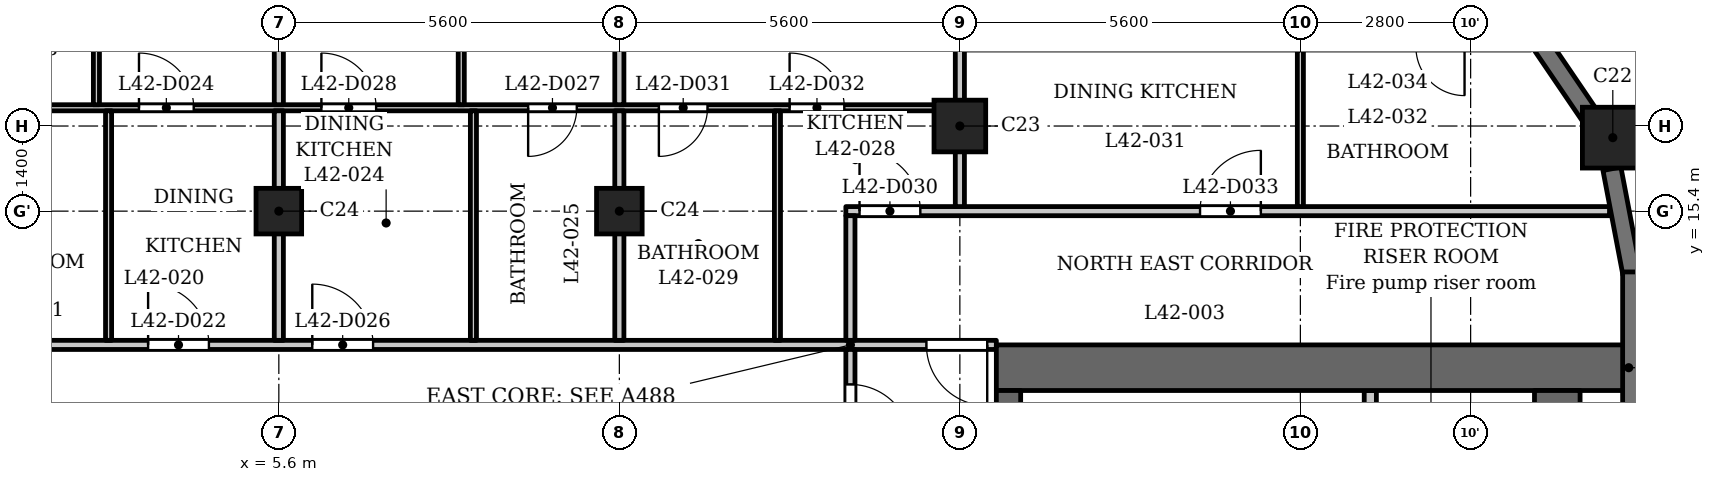
"""IFC4 building model, lengths in metres.
Left out: names, types, materials, properties, quantities, classifications, styles, units other than length and angle.
Written with IfcOpenShell. Run it as: python <this file> out.ifc"""

import sys

from ifc_helpers import new_model, si_unit, direction, frame, frame_2d, origin, origin_2d, place, context, subcontext, project, spatial, rectangle, extrude, element, fill, save


model = new_model("IFC4")
c1 = context("Model", 3, precision=1e-05, world=origin(), true_north=direction((0.0, 1.0)))
c2 = subcontext(c1, "Body", "Model", "MODEL_VIEW")
j1 = project(units=[si_unit("LENGTHUNIT", "METRE"), si_unit("PLANEANGLEUNIT", "RADIAN")], contexts=[c1])
p1 = place(None, origin())
s1 = spatial("IfcSite", under=j1, at=p1, CompositionType="ELEMENT")
p2 = place(p1, origin())
s2 = spatial("IfcBuilding", under=s1, at=p2, CompositionType="ELEMENT")
p3 = place(p2, frame((0.0, 0.0, 164.1)))
s3 = spatial("IfcBuildingStorey", under=s2, at=p3, CompositionType="ELEMENT", Elevation=164.1)
p4 = place(p3, frame((27.538, 16.609, 0.0), z_axis=(0.0, 0.0, 1.0), x_axis=(1.0, 0.0, 0.0)))
e1 = element("IfcColumn", 1, at=p4, inside=s3, PredefinedType="COLUMN", context=c2, shape_type="SweptSolid", body=[
    extrude(rectangle(XDim=1.0, YDim=1.0, at=origin_2d()), origin(), (0.0, 0.0, 1.0), 3.5),
])
p5 = place(p3, frame((16.8, 16.8, 0.0), z_axis=(0.0, 0.0, 1.0), x_axis=(1.0, 0.0, 0.0)))
e2 = element("IfcColumn", 2, at=p5, inside=s3, PredefinedType="COLUMN", context=c2, shape_type="SweptSolid", body=[
    extrude(rectangle(XDim=0.85, YDim=0.85, at=origin_2d()), origin(), (0.0, 0.0, 1.0), 3.5),
])
for number, where, z_axis, x_axis in (
    (3, (5.6, 15.4, 0.0), (0.0, 0.0, 1.0), (1.0, 0.0, 0.0)),
    (4, (11.2, 15.4, 0.0), (0.0, 0.0, 1.0), (1.0, 0.0, 0.0)),
):
    element("IfcColumn", number, at=place(p3, frame(where, z_axis=z_axis, x_axis=x_axis)), inside=s3, PredefinedType="COLUMN", context=c2, shape_type="SweptSolid", body=[
        extrude(rectangle(XDim=0.75, YDim=0.75, at=origin_2d()), origin(), (0.0, 0.0, 1.0), 3.5),
    ])
p6 = place(p3, frame((27.85, 11.7, 0.0), z_axis=(0.0, 0.0, 1.0), x_axis=(0.0, 1.0, 0.0)))
e5 = element("IfcWall", 5, at=p6, inside=s3, PredefinedType="SOLIDWALL", context=c2, shape_type="SweptSolid", body=[
    extrude(rectangle(XDim=2.7, YDim=0.3, at=frame_2d((1.35, 0.0))), origin(), (0.0, 0.0, 1.0), 2.45),
])
for number, where, z_axis, x_axis in (
    (6, (27.853, 14.372, 0.0), (0.0, 0.0, 1.0), (-0.187, 0.982, 0.0)),
    (7, (27.166, 16.96, 0.0), (0.0, 0.0, 1.0), (-0.562, 0.827, 0.0)),
):
    element("IfcWall", number, at=place(p3, frame(where, z_axis=z_axis, x_axis=x_axis)), inside=s3, PredefinedType="SOLIDWALL", context=c2, shape_type="SweptSolid", body=[
        extrude(rectangle(XDim=1.756, YDim=0.3, at=frame_2d((0.878, 0.0))), origin(), (0.0, 0.0, 1.0), 2.45),
    ])
p7 = place(p3, frame((17.4, 12.825, 0.0), z_axis=(0.0, 0.0, 1.0), x_axis=(1.0, 0.0, 0.0)))
e8 = element("IfcWall", 8, at=p7, inside=s3, PredefinedType="SHEAR", context=c2, shape_type="SweptSolid", body=[
    extrude(rectangle(XDim=10.4, YDim=0.75, at=frame_2d((5.2, 0.0))), origin(), (0.0, 0.0, 1.0), 3.2),
])
p8 = place(p3, frame((17.6, -12.45, 0.0), z_axis=(0.0, 0.0, 1.0), x_axis=(0.0, 1.0, 0.0)))
e9 = element("IfcWall", 9, at=p8, inside=s3, PredefinedType="SHEAR", context=c2, shape_type="SweptSolid", body=[
    extrude(rectangle(XDim=24.9, YDim=0.4, at=frame_2d((12.45, 0.0))), origin(), (0.0, 0.0, 1.0), 3.2),
])
p9 = place(p8, frame((8.65, 0.0, 0.0)))
e10 = element("IfcOpeningElement", 10, at=p9, cuts=e9, PredefinedType="OPENING", context=c2, shape_type="SweptSolid", body=[
    extrude(rectangle(XDim=0.9, YDim=2.1, at=frame_2d((0.45, 1.05))), frame((0.0, 0.21, 0.0), z_axis=(0.0, -1.0, 0.0), x_axis=(1.0, 0.0, 0.0)), (0.0, 0.0, 1.0), 0.42),
])
p10 = place(p8, frame((15.6, 0.0, 0.0)))
e11 = element("IfcOpeningElement", 11, at=p10, cuts=e9, PredefinedType="OPENING", context=c2, shape_type="SweptSolid", body=[
    extrude(rectangle(XDim=1.1, YDim=2.1, at=frame_2d((0.55, 1.05))), frame((0.0, 0.21, 0.0), z_axis=(0.0, -1.0, 0.0), x_axis=(1.0, 0.0, 0.0)), (0.0, 0.0, 1.0), 0.42),
])
p11 = place(p8, frame((18.0, 0.0, 0.0)))
e12 = element("IfcOpeningElement", 12, at=p11, cuts=e9, PredefinedType="OPENING", context=c2, shape_type="SweptSolid", body=[
    extrude(rectangle(XDim=1.1, YDim=2.1, at=frame_2d((0.55, 1.05))), frame((0.0, 0.21, 0.0), z_axis=(0.0, -1.0, 0.0), x_axis=(1.0, 0.0, 0.0)), (0.0, 0.0, 1.0), 0.42),
])
p12 = place(p8, frame((23.025, 0.0, 0.0)))
e13 = element("IfcOpeningElement", 13, at=p12, cuts=e9, PredefinedType="OPENING", context=c2, shape_type="SweptSolid", body=[
    extrude(rectangle(XDim=1.1, YDim=2.1, at=frame_2d((0.55, 1.05))), frame((0.0, 0.21, 0.0), z_axis=(0.0, -1.0, 0.0), x_axis=(1.0, 0.0, 0.0)), (0.0, 0.0, 1.0), 0.42),
])
p13 = place(p8, frame((0.775, 0.0, 0.0)))
e14 = element("IfcOpeningElement", 14, at=p13, cuts=e9, PredefinedType="OPENING", context=c2, shape_type="SweptSolid", body=[
    extrude(rectangle(XDim=1.1, YDim=2.1, at=frame_2d((0.55, 1.05))), frame((0.0, 0.21, 0.0), z_axis=(0.0, -1.0, 0.0), x_axis=(1.0, 0.0, 0.0)), (0.0, 0.0, 1.0), 0.42),
])
p14 = place(p8, frame((12.925, 0.0, 0.0)))
e15 = element("IfcOpeningElement", 15, at=p14, cuts=e9, PredefinedType="OPENING", context=c2, shape_type="SweptSolid", body=[
    extrude(rectangle(XDim=1.8, YDim=2.1, at=frame_2d((0.9, 1.05))), frame((0.0, 0.21, 0.0), z_axis=(0.0, -1.0, 0.0), x_axis=(1.0, 0.0, 0.0)), (0.0, 0.0, 1.0), 0.42),
])
p15 = place(p3, frame((26.625, -12.45, 0.0), z_axis=(0.0, 0.0, 1.0), x_axis=(0.0, 1.0, 0.0)))
e16 = element("IfcWall", 16, at=p15, inside=s3, PredefinedType="SHEAR", context=c2, shape_type="SweptSolid", body=[
    extrude(rectangle(XDim=24.9, YDim=0.75, at=frame_2d((12.45, 0.0))), origin(), (0.0, 0.0, 1.0), 3.2),
])
p16 = place(p3, frame((23.55, 9.8, 0.0), z_axis=(0.0, 0.0, 1.0), x_axis=(0.0, 1.0, 0.0)))
e17 = element("IfcWall", 17, at=p16, inside=s3, PredefinedType="PARTITIONING", context=c2, shape_type="SweptSolid", body=[
    extrude(rectangle(XDim=2.65, YDim=0.2, at=frame_2d((1.325, 0.0))), origin(), (0.0, 0.0, 1.0), 3.2),
])
p17 = place(p16, frame((0.875, 0.0, 0.0)))
e18 = element("IfcOpeningElement", 18, at=p17, cuts=e17, PredefinedType="OPENING", context=c2, shape_type="SweptSolid", body=[
    extrude(rectangle(XDim=0.9, YDim=2.1, at=frame_2d((0.45, 1.05))), frame((0.0, 0.11, 0.0), z_axis=(0.0, -1.0, 0.0), x_axis=(1.0, 0.0, 0.0)), (0.0, 0.0, 1.0), 0.22),
])
p18 = place(p3, frame((-17.4, 13.2, 0.0), z_axis=(0.0, 0.0, 1.0), x_axis=(1.0, 0.0, 0.0)))
e19 = element("IfcWall", 19, at=p18, inside=s3, PredefinedType="PARTITIONING", context=c2, shape_type="SweptSolid", body=[
    extrude(rectangle(XDim=34.8, YDim=0.15, at=frame_2d((17.4, 0.0))), origin(), (0.0, 0.0, 1.0), 3.2),
])
p19 = place(p18, frame((0.25, 0.0, 0.0)))
e20 = element("IfcOpeningElement", 20, at=p19, cuts=e19, PredefinedType="OPENING", context=c2, shape_type="SweptSolid", body=[
    extrude(rectangle(XDim=1.0, YDim=2.1, at=frame_2d((0.5, 1.05))), frame((0.0, 0.085, 0.0), z_axis=(0.0, -1.0, 0.0), x_axis=(1.0, 0.0, 0.0)), (0.0, 0.0, 1.0), 0.17),
])
p20 = place(p18, frame((33.65, 0.0, 0.0)))
e21 = element("IfcOpeningElement", 21, at=p20, cuts=e19, PredefinedType="OPENING", context=c2, shape_type="SweptSolid", body=[
    extrude(rectangle(XDim=1.0, YDim=2.1, at=frame_2d((0.5, 1.05))), frame((0.0, 0.085, 0.0), z_axis=(0.0, -1.0, 0.0), x_axis=(1.0, 0.0, 0.0)), (0.0, 0.0, 1.0), 0.17),
])
p21 = place(p18, frame((15.75, 0.0, 0.0)))
e22 = element("IfcOpeningElement", 22, at=p21, cuts=e19, PredefinedType="OPENING", context=c2, shape_type="SweptSolid", body=[
    extrude(rectangle(XDim=1.0, YDim=2.1, at=frame_2d((0.5, 1.05))), frame((0.0, 0.085, 0.0), z_axis=(0.0, -1.0, 0.0), x_axis=(1.0, 0.0, 0.0)), (0.0, 0.0, 1.0), 0.17),
])
p22 = place(p18, frame((20.85, 0.0, 0.0)))
e23 = element("IfcOpeningElement", 23, at=p22, cuts=e19, PredefinedType="OPENING", context=c2, shape_type="SweptSolid", body=[
    extrude(rectangle(XDim=1.0, YDim=2.1, at=frame_2d((0.5, 1.05))), frame((0.0, 0.085, 0.0), z_axis=(0.0, -1.0, 0.0), x_axis=(1.0, 0.0, 0.0)), (0.0, 0.0, 1.0), 0.17),
])
p23 = place(p18, frame((23.55, 0.0, 0.0)))
e24 = element("IfcOpeningElement", 24, at=p23, cuts=e19, PredefinedType="OPENING", context=c2, shape_type="SweptSolid", body=[
    extrude(rectangle(XDim=1.0, YDim=2.1, at=frame_2d((0.5, 1.05))), frame((0.0, 0.085, 0.0), z_axis=(0.0, -1.0, 0.0), x_axis=(1.0, 0.0, 0.0)), (0.0, 0.0, 1.0), 0.17),
])
p24 = place(p3, frame((14.925, 15.4, 0.0), z_axis=(0.0, 0.0, 1.0), x_axis=(1.0, 0.0, 0.0)))
e25 = element("IfcWall", 25, at=p24, inside=s3, PredefinedType="PARTITIONING", context=c2, shape_type="SweptSolid", body=[
    extrude(rectangle(XDim=12.559, YDim=0.15, at=frame_2d((6.279, 0.0))), origin(), (0.0, 0.0, 1.0), 3.2),
])
p25 = place(p24, frame((0.225, 0.0, 0.0)))
e26 = element("IfcOpeningElement", 26, at=p25, cuts=e25, PredefinedType="OPENING", context=c2, shape_type="SweptSolid", body=[
    extrude(rectangle(XDim=1.0, YDim=2.1, at=frame_2d((0.5, 1.05))), frame((0.0, 0.085, 0.0), z_axis=(0.0, -1.0, 0.0), x_axis=(1.0, 0.0, 0.0)), (0.0, 0.0, 1.0), 0.17),
])
p26 = place(p24, frame((5.825, 0.0, 0.0)))
e27 = element("IfcOpeningElement", 27, at=p26, cuts=e25, PredefinedType="OPENING", context=c2, shape_type="SweptSolid", body=[
    extrude(rectangle(XDim=1.0, YDim=2.1, at=frame_2d((0.5, 1.05))), frame((0.0, 0.085, 0.0), z_axis=(0.0, -1.0, 0.0), x_axis=(1.0, 0.0, 0.0)), (0.0, 0.0, 1.0), 0.17),
])
p27 = place(p3, frame((-16.725, 17.1, 0.0), z_axis=(0.0, 0.0, 1.0), x_axis=(1.0, 0.0, 0.0)))
e28 = element("IfcWall", 28, at=p27, inside=s3, PredefinedType="PARTITIONING", context=c2, shape_type="SweptSolid", body=[
    extrude(rectangle(XDim=33.45, YDim=0.1, at=frame_2d((16.725, 0.0))), origin(), (0.0, 0.0, 1.0), 3.2),
])
p28 = place(p27, frame((11.925, 0.0, 0.0)))
e29 = element("IfcOpeningElement", 29, at=p28, cuts=e28, PredefinedType="OPENING", context=c2, shape_type="SweptSolid", body=[
    extrude(rectangle(XDim=0.9, YDim=2.1, at=frame_2d((0.45, 1.05))), frame((0.0, 0.06, 0.0), z_axis=(0.0, -1.0, 0.0), x_axis=(1.0, 0.0, 0.0)), (0.0, 0.0, 1.0), 0.12),
])
p29 = place(p27, frame((15.175, 0.0, 0.0)))
e30 = element("IfcOpeningElement", 30, at=p29, cuts=e28, PredefinedType="OPENING", context=c2, shape_type="SweptSolid", body=[
    extrude(rectangle(XDim=0.9, YDim=2.1, at=frame_2d((0.45, 1.05))), frame((0.0, 0.06, 0.0), z_axis=(0.0, -1.0, 0.0), x_axis=(1.0, 0.0, 0.0)), (0.0, 0.0, 1.0), 0.12),
])
p30 = place(p27, frame((6.575, 0.0, 0.0)))
e31 = element("IfcOpeningElement", 31, at=p30, cuts=e28, PredefinedType="OPENING", context=c2, shape_type="SweptSolid", body=[
    extrude(rectangle(XDim=0.9, YDim=2.1, at=frame_2d((0.45, 1.05))), frame((0.0, 0.06, 0.0), z_axis=(0.0, -1.0, 0.0), x_axis=(1.0, 0.0, 0.0)), (0.0, 0.0, 1.0), 0.12),
])
p31 = place(p27, frame((17.375, 0.0, 0.0)))
e32 = element("IfcOpeningElement", 32, at=p31, cuts=e28, PredefinedType="OPENING", context=c2, shape_type="SweptSolid", body=[
    extrude(rectangle(XDim=0.8, YDim=2.1, at=frame_2d((0.4, 1.05))), frame((0.0, 0.06, 0.0), z_axis=(0.0, -1.0, 0.0), x_axis=(1.0, 0.0, 0.0)), (0.0, 0.0, 1.0), 0.12),
])
p32 = place(p27, frame((20.025, 0.0, 0.0)))
e33 = element("IfcOpeningElement", 33, at=p32, cuts=e28, PredefinedType="OPENING", context=c2, shape_type="SweptSolid", body=[
    extrude(rectangle(XDim=0.9, YDim=2.1, at=frame_2d((0.45, 1.05))), frame((0.0, 0.06, 0.0), z_axis=(0.0, -1.0, 0.0), x_axis=(1.0, 0.0, 0.0)), (0.0, 0.0, 1.0), 0.12),
])
p33 = place(p27, frame((26.425, 0.0, 0.0)))
e34 = element("IfcOpeningElement", 34, at=p33, cuts=e28, PredefinedType="OPENING", context=c2, shape_type="SweptSolid", body=[
    extrude(rectangle(XDim=0.8, YDim=2.1, at=frame_2d((0.4, 1.05))), frame((0.0, 0.06, 0.0), z_axis=(0.0, -1.0, 0.0), x_axis=(1.0, 0.0, 0.0)), (0.0, 0.0, 1.0), 0.12),
])
p34 = place(p27, frame((23.025, 0.0, 0.0)))
e35 = element("IfcOpeningElement", 35, at=p34, cuts=e28, PredefinedType="OPENING", context=c2, shape_type="SweptSolid", body=[
    extrude(rectangle(XDim=0.9, YDim=2.1, at=frame_2d((0.45, 1.05))), frame((0.0, 0.06, 0.0), z_axis=(0.0, -1.0, 0.0), x_axis=(1.0, 0.0, 0.0)), (0.0, 0.0, 1.0), 0.12),
])
p35 = place(p27, frame((28.575, 0.0, 0.0)))
e36 = element("IfcOpeningElement", 36, at=p35, cuts=e28, PredefinedType="OPENING", context=c2, shape_type="SweptSolid", body=[
    extrude(rectangle(XDim=0.8, YDim=2.1, at=frame_2d((0.4, 1.05))), frame((0.0, 0.06, 0.0), z_axis=(0.0, -1.0, 0.0), x_axis=(1.0, 0.0, 0.0)), (0.0, 0.0, 1.0), 0.12),
])
p36 = place(p27, frame((30.725, 0.0, 0.0)))
e37 = element("IfcOpeningElement", 37, at=p36, cuts=e28, PredefinedType="OPENING", context=c2, shape_type="SweptSolid", body=[
    extrude(rectangle(XDim=0.9, YDim=2.1, at=frame_2d((0.45, 1.05))), frame((0.0, 0.06, 0.0), z_axis=(0.0, -1.0, 0.0), x_axis=(1.0, 0.0, 0.0)), (0.0, 0.0, 1.0), 0.12),
])
p37 = place(p3, frame((2.6, 17.15, 0.0), z_axis=(0.0, 0.0, 1.0), x_axis=(0.0, 1.0, 0.0)))
e38 = element("IfcWall", 38, at=p37, inside=s3, PredefinedType="PARTITIONING", context=c2, shape_type="SweptSolid", body=[
    extrude(rectangle(XDim=4.93, YDim=0.1, at=frame_2d((2.465, 0.0))), origin(), (0.0, 0.0, 1.0), 3.2),
])
p38 = place(p37, frame((3.61, 0.0, 0.0)))
e39 = element("IfcOpeningElement", 39, at=p38, cuts=e38, PredefinedType="OPENING", context=c2, shape_type="SweptSolid", body=[
    extrude(rectangle(XDim=0.9, YDim=2.1, at=frame_2d((0.45, 1.05))), frame((0.0, 0.06, 0.0), z_axis=(0.0, -1.0, 0.0), x_axis=(1.0, 0.0, 0.0)), (0.0, 0.0, 1.0), 0.12),
])
p39 = place(p3, frame((2.8, 13.275, 0.0), z_axis=(0.0, 0.0, 1.0), x_axis=(0.0, 1.0, 0.0)))
e40 = element("IfcWall", 40, at=p39, inside=s3, PredefinedType="PARTITIONING", context=c2, shape_type="SweptSolid", body=[
    extrude(rectangle(XDim=3.775, YDim=0.1, at=frame_2d((1.888, 0.0))), origin(), (0.0, 0.0, 1.0), 3.2),
])
p40 = place(p3, frame((5.6, 13.275, 0.0), z_axis=(0.0, 0.0, 1.0), x_axis=(0.0, 1.0, 0.0)))
e41 = element("IfcWall", 41, at=p40, inside=s3, PredefinedType="PARTITIONING", context=c2, shape_type="SweptSolid", body=[
    extrude(rectangle(XDim=3.775, YDim=0.15, at=frame_2d((1.888, 0.0))), origin(), (0.0, 0.0, 1.0), 3.2),
])
p41 = place(p3, frame((5.6, 17.15, 0.0), z_axis=(0.0, 0.0, 1.0), x_axis=(0.0, 1.0, 0.0)))
e42 = element("IfcWall", 42, at=p41, inside=s3, PredefinedType="PARTITIONING", context=c2, shape_type="SweptSolid", body=[
    extrude(rectangle(XDim=5.73, YDim=0.15, at=frame_2d((2.865, 0.0))), origin(), (0.0, 0.0, 1.0), 3.2),
])
p42 = place(p3, frame((8.6, 17.15, 0.0), z_axis=(0.0, 0.0, 1.0), x_axis=(0.0, 1.0, 0.0)))
e43 = element("IfcWall", 43, at=p42, inside=s3, PredefinedType="PARTITIONING", context=c2, shape_type="SweptSolid", body=[
    extrude(rectangle(XDim=4.93, YDim=0.1, at=frame_2d((2.465, 0.0))), origin(), (0.0, 0.0, 1.0), 3.2),
])
p43 = place(p42, frame((1.35, 0.0, 0.0)))
e44 = element("IfcOpeningElement", 44, at=p43, cuts=e43, PredefinedType="OPENING", context=c2, shape_type="SweptSolid", body=[
    extrude(rectangle(XDim=0.9, YDim=2.1, at=frame_2d((0.45, 1.05))), frame((0.0, 0.06, 0.0), z_axis=(0.0, -1.0, 0.0), x_axis=(1.0, 0.0, 0.0)), (0.0, 0.0, 1.0), 0.12),
])
p44 = place(p3, frame((8.8, 13.275, 0.0), z_axis=(0.0, 0.0, 1.0), x_axis=(0.0, 1.0, 0.0)))
e45 = element("IfcWall", 45, at=p44, inside=s3, PredefinedType="PARTITIONING", context=c2, shape_type="SweptSolid", body=[
    extrude(rectangle(XDim=3.775, YDim=0.1, at=frame_2d((1.888, 0.0))), origin(), (0.0, 0.0, 1.0), 3.2),
])
p45 = place(p3, frame((11.2, 13.275, 0.0), z_axis=(0.0, 0.0, 1.0), x_axis=(0.0, 1.0, 0.0)))
e46 = element("IfcWall", 46, at=p45, inside=s3, PredefinedType="PARTITIONING", context=c2, shape_type="SweptSolid", body=[
    extrude(rectangle(XDim=3.775, YDim=0.15, at=frame_2d((1.888, 0.0))), origin(), (0.0, 0.0, 1.0), 3.2),
])
p46 = place(p3, frame((11.2, 17.15, 0.0), z_axis=(0.0, 0.0, 1.0), x_axis=(0.0, 1.0, 0.0)))
e47 = element("IfcWall", 47, at=p46, inside=s3, PredefinedType="PARTITIONING", context=c2, shape_type="SweptSolid", body=[
    extrude(rectangle(XDim=5.73, YDim=0.15, at=frame_2d((2.865, 0.0))), origin(), (0.0, 0.0, 1.0), 3.2),
])
p47 = place(p3, frame((13.8, 13.275, 0.0), z_axis=(0.0, 0.0, 1.0), x_axis=(0.0, 1.0, 0.0)))
e48 = element("IfcWall", 48, at=p47, inside=s3, PredefinedType="PARTITIONING", context=c2, shape_type="SweptSolid", body=[
    extrude(rectangle(XDim=3.775, YDim=0.1, at=frame_2d((1.888, 0.0))), origin(), (0.0, 0.0, 1.0), 3.2),
])
p48 = place(p3, frame((15.0, 6.769, 0.0), z_axis=(0.0, 0.0, 1.0), x_axis=(0.0, 1.0, 0.0)))
e49 = element("IfcWall", 49, at=p48, inside=s3, PredefinedType="PARTITIONING", context=c2, shape_type="SweptSolid", body=[
    extrude(rectangle(XDim=6.356, YDim=0.15, at=frame_2d((3.178, 0.0))), origin(), (0.0, 0.0, 1.0), 3.2),
])
p49 = place(p48, frame((4.781, 0.0, 0.0)))
e50 = element("IfcOpeningElement", 50, at=p49, cuts=e49, PredefinedType="OPENING", context=c2, shape_type="SweptSolid", body=[
    extrude(rectangle(XDim=1.0, YDim=2.1, at=frame_2d((0.5, 1.05))), frame((0.0, 0.085, 0.0), z_axis=(0.0, -1.0, 0.0), x_axis=(1.0, 0.0, 0.0)), (0.0, 0.0, 1.0), 0.17),
])
p50 = place(p3, frame((15.0, 13.275, 0.0), z_axis=(0.0, 0.0, 1.0), x_axis=(0.0, 1.0, 0.0)))
e51 = element("IfcWall", 51, at=p50, inside=s3, PredefinedType="PARTITIONING", context=c2, shape_type="SweptSolid", body=[
    extrude(rectangle(XDim=2.05, YDim=0.15, at=frame_2d((1.025, 0.0))), origin(), (0.0, 0.0, 1.0), 3.2),
])
p51 = place(p3, frame((16.8, 15.475, 0.0), z_axis=(0.0, 0.0, 1.0), x_axis=(0.0, 1.0, 0.0)))
e52 = element("IfcWall", 52, at=p51, inside=s3, PredefinedType="PARTITIONING", context=c2, shape_type="SweptSolid", body=[
    extrude(rectangle(XDim=7.405, YDim=0.15, at=frame_2d((3.702, 0.0))), origin(), (0.0, 0.0, 1.0), 3.2),
])
p52 = place(p3, frame((22.4, 15.475, 0.0), z_axis=(0.0, 0.0, 1.0), x_axis=(0.0, 1.0, 0.0)))
e53 = element("IfcWall", 53, at=p52, inside=s3, PredefinedType="PARTITIONING", context=c2, shape_type="SweptSolid", body=[
    extrude(rectangle(XDim=2.575, YDim=0.1, at=frame_2d((1.288, 0.0))), origin(), (0.0, 0.0, 1.0), 3.2),
])
p53 = place(p49, origin())
e54 = element("IfcDoor", 54, at=p53, inside=s3, OperationType="SINGLE_SWING_LEFT", PredefinedType="DOOR", context=c2, shape_type="SweptSolid", body=[
    extrude(rectangle(XDim=1.0, YDim=2.1, at=frame_2d((0.5, 1.05))), frame((0.0, 0.025, 0.0), z_axis=(0.0, -1.0, 0.0), x_axis=(1.0, 0.0, 0.0)), (0.0, 0.0, 1.0), 0.05),
])
fill(e50, e54)
p54 = place(p20, origin())
e55 = element("IfcDoor", 55, at=p54, inside=s3, OperationType="SINGLE_SWING_RIGHT", PredefinedType="DOOR", context=c2, shape_type="SweptSolid", body=[
    extrude(rectangle(XDim=1.0, YDim=2.1, at=frame_2d((0.5, 1.05))), frame((0.0, 0.025, 0.0), z_axis=(0.0, -1.0, 0.0), x_axis=(1.0, 0.0, 0.0)), (0.0, 0.0, 1.0), 0.05),
])
fill(e21, e55)
p55 = place(p22, origin())
e56 = element("IfcDoor", 56, at=p55, inside=s3, OperationType="SINGLE_SWING_RIGHT", PredefinedType="DOOR", context=c2, shape_type="SweptSolid", body=[
    extrude(rectangle(XDim=1.0, YDim=2.1, at=frame_2d((0.5, 1.05))), frame((0.0, 0.025, 0.0), z_axis=(0.0, -1.0, 0.0), x_axis=(1.0, 0.0, 0.0)), (0.0, 0.0, 1.0), 0.05),
])
fill(e23, e56)
p56 = place(p32, origin())
e57 = element("IfcDoor", 57, at=p56, inside=s3, OperationType="SINGLE_SWING_RIGHT", PredefinedType="DOOR", context=c2, shape_type="SweptSolid", body=[
    extrude(rectangle(XDim=0.9, YDim=2.1, at=frame_2d((0.45, 1.05))), frame((0.0, 0.025, 0.0), z_axis=(0.0, -1.0, 0.0), x_axis=(1.0, 0.0, 0.0)), (0.0, 0.0, 1.0), 0.05),
])
fill(e33, e57)
p57 = place(p23, origin())
e58 = element("IfcDoor", 58, at=p57, inside=s3, OperationType="SINGLE_SWING_RIGHT", PredefinedType="DOOR", context=c2, shape_type="SweptSolid", body=[
    extrude(rectangle(XDim=1.0, YDim=2.1, at=frame_2d((0.5, 1.05))), frame((0.0, 0.025, 0.0), z_axis=(0.0, -1.0, 0.0), x_axis=(1.0, 0.0, 0.0)), (0.0, 0.0, 1.0), 0.05),
])
fill(e24, e58)
p58 = place(p33, origin())
e59 = element("IfcDoor", 59, at=p58, inside=s3, OperationType="SINGLE_SWING_LEFT", PredefinedType="DOOR", context=c2, shape_type="SweptSolid", body=[
    extrude(rectangle(XDim=0.8, YDim=2.1, at=frame_2d((0.4, 1.05))), frame((0.0, 0.025, 0.0), z_axis=(0.0, -1.0, 0.0), x_axis=(1.0, 0.0, 0.0)), (0.0, 0.0, 1.0), 0.05),
])
fill(e34, e59)
p59 = place(p34, origin())
e60 = element("IfcDoor", 60, at=p59, inside=s3, OperationType="SINGLE_SWING_RIGHT", PredefinedType="DOOR", context=c2, shape_type="SweptSolid", body=[
    extrude(rectangle(XDim=0.9, YDim=2.1, at=frame_2d((0.45, 1.05))), frame((0.0, 0.025, 0.0), z_axis=(0.0, -1.0, 0.0), x_axis=(1.0, 0.0, 0.0)), (0.0, 0.0, 1.0), 0.05),
])
fill(e35, e60)
p60 = place(p25, origin())
e61 = element("IfcDoor", 61, at=p60, inside=s3, OperationType="SINGLE_SWING_RIGHT", PredefinedType="DOOR", context=c2, shape_type="SweptSolid", body=[
    extrude(rectangle(XDim=1.0, YDim=2.1, at=frame_2d((0.5, 1.05))), frame((0.0, 0.025, 0.0), z_axis=(0.0, -1.0, 0.0), x_axis=(1.0, 0.0, 0.0)), (0.0, 0.0, 1.0), 0.05),
])
fill(e26, e61)
p61 = place(p35, origin())
e62 = element("IfcDoor", 62, at=p61, inside=s3, OperationType="SINGLE_SWING_LEFT", PredefinedType="DOOR", context=c2, shape_type="SweptSolid", body=[
    extrude(rectangle(XDim=0.8, YDim=2.1, at=frame_2d((0.4, 1.05))), frame((0.0, 0.025, 0.0), z_axis=(0.0, -1.0, 0.0), x_axis=(1.0, 0.0, 0.0)), (0.0, 0.0, 1.0), 0.05),
])
fill(e36, e62)
p62 = place(p36, origin())
e63 = element("IfcDoor", 63, at=p62, inside=s3, OperationType="SINGLE_SWING_RIGHT", PredefinedType="DOOR", context=c2, shape_type="SweptSolid", body=[
    extrude(rectangle(XDim=0.9, YDim=2.1, at=frame_2d((0.45, 1.05))), frame((0.0, 0.025, 0.0), z_axis=(0.0, -1.0, 0.0), x_axis=(1.0, 0.0, 0.0)), (0.0, 0.0, 1.0), 0.05),
])
fill(e37, e63)
p63 = place(p26, origin())
e64 = element("IfcDoor", 64, at=p63, inside=s3, OperationType="SINGLE_SWING_LEFT", PredefinedType="DOOR", context=c2, shape_type="SweptSolid", body=[
    extrude(rectangle(XDim=1.0, YDim=2.1, at=frame_2d((0.5, 1.05))), frame((0.0, 0.025, 0.0), z_axis=(0.0, -1.0, 0.0), x_axis=(1.0, 0.0, 0.0)), (0.0, 0.0, 1.0), 0.05),
])
fill(e27, e64)
save(model, sys.argv[1])
